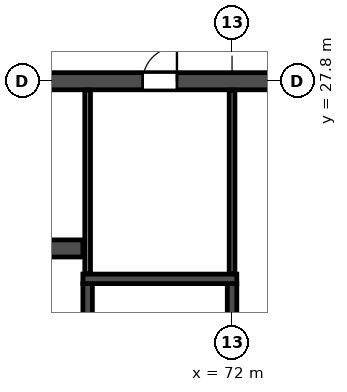
"""IFC4 building model, lengths in metres.
Left out: names, types, materials, properties, quantities, classifications, styles, units other than length and angle.
Written with IfcOpenShell. Run it as: python <this file> out.ifc"""

import sys

from ifc_helpers import new_model, si_unit, direction, frame, frame_2d, origin, place, context, subcontext, project, spatial, rectangle, extrude, element, fill, save


model = new_model("IFC4")
c1 = context("Model", 3, precision=1e-05, world=origin(), true_north=direction((0.0, 1.0)))
c2 = subcontext(c1, "Body", "Model", "MODEL_VIEW")
j1 = project(units=[si_unit("LENGTHUNIT", "METRE"), si_unit("PLANEANGLEUNIT", "RADIAN")], contexts=[c1])
p1 = place(None, origin())
s1 = spatial("IfcSite", under=j1, at=p1, CompositionType="ELEMENT")
p2 = place(p1, origin())
s2 = spatial("IfcBuilding", under=s1, at=p2, CompositionType="ELEMENT")
p3 = place(p2, frame((0.0, 0.0, 142.2)))
s3 = spatial("IfcBuildingStorey", under=s2, at=p3, CompositionType="ELEMENT", Elevation=142.2)
p4 = place(p3, frame((12.2, 27.8, 0.0), z_axis=(0.0, 0.0, 1.0), x_axis=(1.0, 0.0, 0.0)))
e1 = element("IfcWall", 1, at=p4, inside=s3, PredefinedType="SOLIDWALL", context=c2, shape_type="SweptSolid", body=[
    extrude(rectangle(XDim=77.6, YDim=0.45, at=frame_2d((38.8, 0.0))), origin(), (0.0, 0.0, 1.0), 3.07),
])
p5 = place(p4, frame((2.3, 0.0, 0.0)))
e2 = element("IfcOpeningElement", 2, at=p5, cuts=e1, PredefinedType="OPENING", context=c2, shape_type="SweptSolid", body=[
    extrude(rectangle(XDim=1.0, YDim=2.1, at=frame_2d((0.5, 1.05))), frame((0.0, 0.235, 0.0), z_axis=(0.0, -1.0, 0.0), x_axis=(1.0, 0.0, 0.0)), (0.0, 0.0, 1.0), 0.47),
])
p6 = place(p4, frame((6.7, 0.0, 0.0)))
e3 = element("IfcOpeningElement", 3, at=p6, cuts=e1, PredefinedType="OPENING", context=c2, shape_type="SweptSolid", body=[
    extrude(rectangle(XDim=1.0, YDim=2.1, at=frame_2d((0.5, 1.05))), frame((0.0, 0.235, 0.0), z_axis=(0.0, -1.0, 0.0), x_axis=(1.0, 0.0, 0.0)), (0.0, 0.0, 1.0), 0.47),
])
p7 = place(p4, frame((10.05, 0.0, 0.0)))
e4 = element("IfcOpeningElement", 4, at=p7, cuts=e1, PredefinedType="OPENING", context=c2, shape_type="SweptSolid", body=[
    extrude(rectangle(XDim=0.9, YDim=2.1, at=frame_2d((0.45, 1.05))), frame((0.0, 0.235, 0.0), z_axis=(0.0, -1.0, 0.0), x_axis=(1.0, 0.0, 0.0)), (0.0, 0.0, 1.0), 0.47),
])
p8 = place(p4, frame((19.25, 0.0, 0.0)))
e5 = element("IfcOpeningElement", 5, at=p8, cuts=e1, PredefinedType="OPENING", context=c2, shape_type="SweptSolid", body=[
    extrude(rectangle(XDim=0.9, YDim=2.1, at=frame_2d((0.45, 1.05))), frame((0.0, 0.235, 0.0), z_axis=(0.0, -1.0, 0.0), x_axis=(1.0, 0.0, 0.0)), (0.0, 0.0, 1.0), 0.47),
])
p9 = place(p4, frame((23.7, 0.0, 0.0)))
e6 = element("IfcOpeningElement", 6, at=p9, cuts=e1, PredefinedType="OPENING", context=c2, shape_type="SweptSolid", body=[
    extrude(rectangle(XDim=1.0, YDim=2.1, at=frame_2d((0.5, 1.05))), frame((0.0, 0.235, 0.0), z_axis=(0.0, -1.0, 0.0), x_axis=(1.0, 0.0, 0.0)), (0.0, 0.0, 1.0), 0.47),
])
p10 = place(p4, frame((28.9, 0.0, 0.0)))
e7 = element("IfcOpeningElement", 7, at=p10, cuts=e1, PredefinedType="OPENING", context=c2, shape_type="SweptSolid", body=[
    extrude(rectangle(XDim=1.0, YDim=2.1, at=frame_2d((0.5, 1.05))), frame((0.0, 0.235, 0.0), z_axis=(0.0, -1.0, 0.0), x_axis=(1.0, 0.0, 0.0)), (0.0, 0.0, 1.0), 0.47),
])
p11 = place(p4, frame((35.4, 0.0, 0.0)))
e8 = element("IfcOpeningElement", 8, at=p11, cuts=e1, PredefinedType="OPENING", context=c2, shape_type="SweptSolid", body=[
    extrude(rectangle(XDim=1.0, YDim=2.1, at=frame_2d((0.5, 1.05))), frame((0.0, 0.235, 0.0), z_axis=(0.0, -1.0, 0.0), x_axis=(1.0, 0.0, 0.0)), (0.0, 0.0, 1.0), 0.47),
])
p12 = place(p4, frame((38.3, 0.0, 0.0)))
e9 = element("IfcOpeningElement", 9, at=p12, cuts=e1, PredefinedType="OPENING", context=c2, shape_type="SweptSolid", body=[
    extrude(rectangle(XDim=1.0, YDim=2.1, at=frame_2d((0.5, 1.05))), frame((0.0, 0.235, 0.0), z_axis=(0.0, -1.0, 0.0), x_axis=(1.0, 0.0, 0.0)), (0.0, 0.0, 1.0), 0.47),
])
p13 = place(p4, frame((41.2, 0.0, 0.0)))
e10 = element("IfcOpeningElement", 10, at=p13, cuts=e1, PredefinedType="OPENING", context=c2, shape_type="SweptSolid", body=[
    extrude(rectangle(XDim=1.0, YDim=2.1, at=frame_2d((0.5, 1.05))), frame((0.0, 0.235, 0.0), z_axis=(0.0, -1.0, 0.0), x_axis=(1.0, 0.0, 0.0)), (0.0, 0.0, 1.0), 0.47),
])
p14 = place(p4, frame((43.8, 0.0, 0.0)))
e11 = element("IfcOpeningElement", 11, at=p14, cuts=e1, PredefinedType="OPENING", context=c2, shape_type="SweptSolid", body=[
    extrude(rectangle(XDim=1.0, YDim=2.1, at=frame_2d((0.5, 1.05))), frame((0.0, 0.235, 0.0), z_axis=(0.0, -1.0, 0.0), x_axis=(1.0, 0.0, 0.0)), (0.0, 0.0, 1.0), 0.47),
])
p15 = place(p4, frame((46.4, 0.0, 0.0)))
e12 = element("IfcOpeningElement", 12, at=p15, cuts=e1, PredefinedType="OPENING", context=c2, shape_type="SweptSolid", body=[
    extrude(rectangle(XDim=1.0, YDim=2.1, at=frame_2d((0.5, 1.05))), frame((0.0, 0.235, 0.0), z_axis=(0.0, -1.0, 0.0), x_axis=(1.0, 0.0, 0.0)), (0.0, 0.0, 1.0), 0.47),
])
p16 = place(p4, frame((49.0, 0.0, 0.0)))
e13 = element("IfcOpeningElement", 13, at=p16, cuts=e1, PredefinedType="OPENING", context=c2, shape_type="SweptSolid", body=[
    extrude(rectangle(XDim=1.0, YDim=2.1, at=frame_2d((0.5, 1.05))), frame((0.0, 0.235, 0.0), z_axis=(0.0, -1.0, 0.0), x_axis=(1.0, 0.0, 0.0)), (0.0, 0.0, 1.0), 0.47),
])
p17 = place(p4, frame((52.9, 0.0, 0.0)))
e14 = element("IfcOpeningElement", 14, at=p17, cuts=e1, PredefinedType="OPENING", context=c2, shape_type="SweptSolid", body=[
    extrude(rectangle(XDim=1.0, YDim=2.1, at=frame_2d((0.5, 1.05))), frame((0.0, 0.235, 0.0), z_axis=(0.0, -1.0, 0.0), x_axis=(1.0, 0.0, 0.0)), (0.0, 0.0, 1.0), 0.47),
])
p18 = place(p4, frame((57.45, 0.0, 0.0)))
e15 = element("IfcOpeningElement", 15, at=p18, cuts=e1, PredefinedType="OPENING", context=c2, shape_type="SweptSolid", body=[
    extrude(rectangle(XDim=0.9, YDim=2.1, at=frame_2d((0.45, 1.05))), frame((0.0, 0.235, 0.0), z_axis=(0.0, -1.0, 0.0), x_axis=(1.0, 0.0, 0.0)), (0.0, 0.0, 1.0), 0.47),
])
p19 = place(p4, frame((66.65, 0.0, 0.0)))
e16 = element("IfcOpeningElement", 16, at=p19, cuts=e1, PredefinedType="OPENING", context=c2, shape_type="SweptSolid", body=[
    extrude(rectangle(XDim=0.9, YDim=2.1, at=frame_2d((0.45, 1.05))), frame((0.0, 0.235, 0.0), z_axis=(0.0, -1.0, 0.0), x_axis=(1.0, 0.0, 0.0)), (0.0, 0.0, 1.0), 0.47),
])
p20 = place(p4, frame((69.9, 0.0, 0.0)))
e17 = element("IfcOpeningElement", 17, at=p20, cuts=e1, PredefinedType="OPENING", context=c2, shape_type="SweptSolid", body=[
    extrude(rectangle(XDim=1.0, YDim=2.1, at=frame_2d((0.5, 1.05))), frame((0.0, 0.235, 0.0), z_axis=(0.0, -1.0, 0.0), x_axis=(1.0, 0.0, 0.0)), (0.0, 0.0, 1.0), 0.47),
])
p21 = place(p4, frame((74.3, 0.0, 0.0)))
e18 = element("IfcOpeningElement", 18, at=p21, cuts=e1, PredefinedType="OPENING", context=c2, shape_type="SweptSolid", body=[
    extrude(rectangle(XDim=1.0, YDim=2.1, at=frame_2d((0.5, 1.05))), frame((0.0, 0.235, 0.0), z_axis=(0.0, -1.0, 0.0), x_axis=(1.0, 0.0, 0.0)), (0.0, 0.0, 1.0), 0.47),
])
p22 = place(p3, frame((33.925, 23.4, 0.0), z_axis=(0.0, 0.0, 1.0), x_axis=(1.0, 0.0, 0.0)))
e19 = element("IfcWall", 19, at=p22, inside=s3, PredefinedType="SOLIDWALL", context=c2, shape_type="SweptSolid", body=[
    extrude(rectangle(XDim=34.15, YDim=0.45, at=frame_2d((17.075, 0.0))), origin(), (0.0, 0.0, 1.0), 3.07),
])
p23 = place(p22, frame((16.175, 0.0, 0.0)))
e20 = element("IfcOpeningElement", 20, at=p23, cuts=e19, PredefinedType="OPENING", context=c2, shape_type="SweptSolid", body=[
    extrude(rectangle(XDim=1.8, YDim=2.1, at=frame_2d((0.9, 1.05))), frame((0.0, 0.235, 0.0), z_axis=(0.0, -1.0, 0.0), x_axis=(1.0, 0.0, 0.0)), (0.0, 0.0, 1.0), 0.47),
])
p24 = place(p22, frame((0.625, 0.0, 0.0)))
e21 = element("IfcOpeningElement", 21, at=p24, cuts=e19, PredefinedType="OPENING", context=c2, shape_type="SweptSolid", body=[
    extrude(rectangle(XDim=1.1, YDim=2.1, at=frame_2d((0.55, 1.05))), frame((0.0, 0.235, 0.0), z_axis=(0.0, -1.0, 0.0), x_axis=(1.0, 0.0, 0.0)), (0.0, 0.0, 1.0), 0.47),
])
p25 = place(p22, frame((3.225, 0.0, 0.0)))
e22 = element("IfcOpeningElement", 22, at=p25, cuts=e19, PredefinedType="OPENING", context=c2, shape_type="SweptSolid", body=[
    extrude(rectangle(XDim=1.1, YDim=2.1, at=frame_2d((0.55, 1.05))), frame((0.0, 0.235, 0.0), z_axis=(0.0, -1.0, 0.0), x_axis=(1.0, 0.0, 0.0)), (0.0, 0.0, 1.0), 0.47),
])
p26 = place(p22, frame((5.825, 0.0, 0.0)))
e23 = element("IfcOpeningElement", 23, at=p26, cuts=e19, PredefinedType="OPENING", context=c2, shape_type="SweptSolid", body=[
    extrude(rectangle(XDim=1.1, YDim=2.1, at=frame_2d((0.55, 1.05))), frame((0.0, 0.235, 0.0), z_axis=(0.0, -1.0, 0.0), x_axis=(1.0, 0.0, 0.0)), (0.0, 0.0, 1.0), 0.47),
])
p27 = place(p22, frame((8.425, 0.0, 0.0)))
e24 = element("IfcOpeningElement", 24, at=p27, cuts=e19, PredefinedType="OPENING", context=c2, shape_type="SweptSolid", body=[
    extrude(rectangle(XDim=1.1, YDim=2.1, at=frame_2d((0.55, 1.05))), frame((0.0, 0.235, 0.0), z_axis=(0.0, -1.0, 0.0), x_axis=(1.0, 0.0, 0.0)), (0.0, 0.0, 1.0), 0.47),
])
p28 = place(p22, frame((11.025, 0.0, 0.0)))
e25 = element("IfcOpeningElement", 25, at=p28, cuts=e19, PredefinedType="OPENING", context=c2, shape_type="SweptSolid", body=[
    extrude(rectangle(XDim=1.1, YDim=2.1, at=frame_2d((0.55, 1.05))), frame((0.0, 0.235, 0.0), z_axis=(0.0, -1.0, 0.0), x_axis=(1.0, 0.0, 0.0)), (0.0, 0.0, 1.0), 0.47),
])
p29 = place(p22, frame((13.625, 0.0, 0.0)))
e26 = element("IfcOpeningElement", 26, at=p29, cuts=e19, PredefinedType="OPENING", context=c2, shape_type="SweptSolid", body=[
    extrude(rectangle(XDim=1.1, YDim=2.1, at=frame_2d((0.55, 1.05))), frame((0.0, 0.235, 0.0), z_axis=(0.0, -1.0, 0.0), x_axis=(1.0, 0.0, 0.0)), (0.0, 0.0, 1.0), 0.47),
])
p30 = place(p22, frame((27.225, 0.0, 0.0)))
e27 = element("IfcOpeningElement", 27, at=p30, cuts=e19, PredefinedType="OPENING", context=c2, shape_type="SweptSolid", body=[
    extrude(rectangle(XDim=1.1, YDim=2.1, at=frame_2d((0.55, 1.05))), frame((0.0, 0.235, 0.0), z_axis=(0.0, -1.0, 0.0), x_axis=(1.0, 0.0, 0.0)), (0.0, 0.0, 1.0), 0.47),
])
p31 = place(p3, frame((68.2, 14.825, 0.0), z_axis=(0.0, 0.0, 1.0), x_axis=(0.0, 1.0, 0.0)))
e28 = element("IfcWall", 28, at=p31, inside=s3, PredefinedType="SOLIDWALL", context=c2, shape_type="SweptSolid", body=[
    extrude(rectangle(XDim=7.65, YDim=0.25, at=frame_2d((3.825, 0.0))), origin(), (0.0, 0.0, 1.0), 3.07),
])
p32 = place(p31, frame((0.475, 0.0, 0.0)))
e29 = element("IfcOpeningElement", 29, at=p32, cuts=e28, PredefinedType="OPENING", context=c2, shape_type="SweptSolid", body=[
    extrude(rectangle(XDim=1.0, YDim=2.1, at=frame_2d((0.5, 1.05))), frame((0.0, 0.135, 0.0), z_axis=(0.0, -1.0, 0.0), x_axis=(1.0, 0.0, 0.0)), (0.0, 0.0, 1.0), 0.27),
])
p33 = place(p3, frame((72.0, 14.825, 0.0), z_axis=(0.0, 0.0, 1.0), x_axis=(0.0, 1.0, 0.0)))
e30 = element("IfcWall", 30, at=p33, inside=s3, PredefinedType="SOLIDWALL", context=c2, shape_type="SweptSolid", body=[
    extrude(rectangle(XDim=7.65, YDim=0.25, at=frame_2d((3.825, 0.0))), origin(), (0.0, 0.0, 1.0), 3.07),
])
p34 = place(p3, frame((68.075, 22.6, 0.0), z_axis=(0.0, 0.0, 1.0), x_axis=(1.0, 0.0, 0.0)))
e31 = element("IfcWall", 31, at=p34, inside=s3, PredefinedType="SOLIDWALL", context=c2, shape_type="SweptSolid", body=[
    extrude(rectangle(XDim=4.05, YDim=0.25, at=frame_2d((2.025, 0.0))), origin(), (0.0, 0.0, 1.0), 3.07),
])
for number, where, z_axis, x_axis in (
    (32, (68.2, 22.735, 0.0), (0.0, 0.0, 1.0), (0.0, 1.0, 0.0)),
    (33, (72.0, 22.735, 0.0), (0.0, 0.0, 1.0), (0.0, 1.0, 0.0)),
):
    element("IfcWall", number, at=place(p3, frame(where, z_axis=z_axis, x_axis=x_axis)), inside=s3, PredefinedType="PARTITIONING", context=c2, shape_type="SweptSolid", body=[
        extrude(rectangle(XDim=4.83, YDim=0.15, at=frame_2d((2.415, 0.0))), origin(), (0.0, 0.0, 1.0), 3.07),
    ])
p35 = place(p18, origin())
e34 = element("IfcDoor", 34, at=p35, inside=s3, OperationType="SINGLE_SWING_RIGHT", PredefinedType="DOOR", context=c2, shape_type="SweptSolid", body=[
    extrude(rectangle(XDim=0.9, YDim=2.1, at=frame_2d((0.45, 1.05))), frame((0.0, 0.025, 0.0), z_axis=(0.0, -1.0, 0.0), x_axis=(1.0, 0.0, 0.0)), (0.0, 0.0, 1.0), 0.05),
])
fill(e15, e34)
save(model, sys.argv[1])
